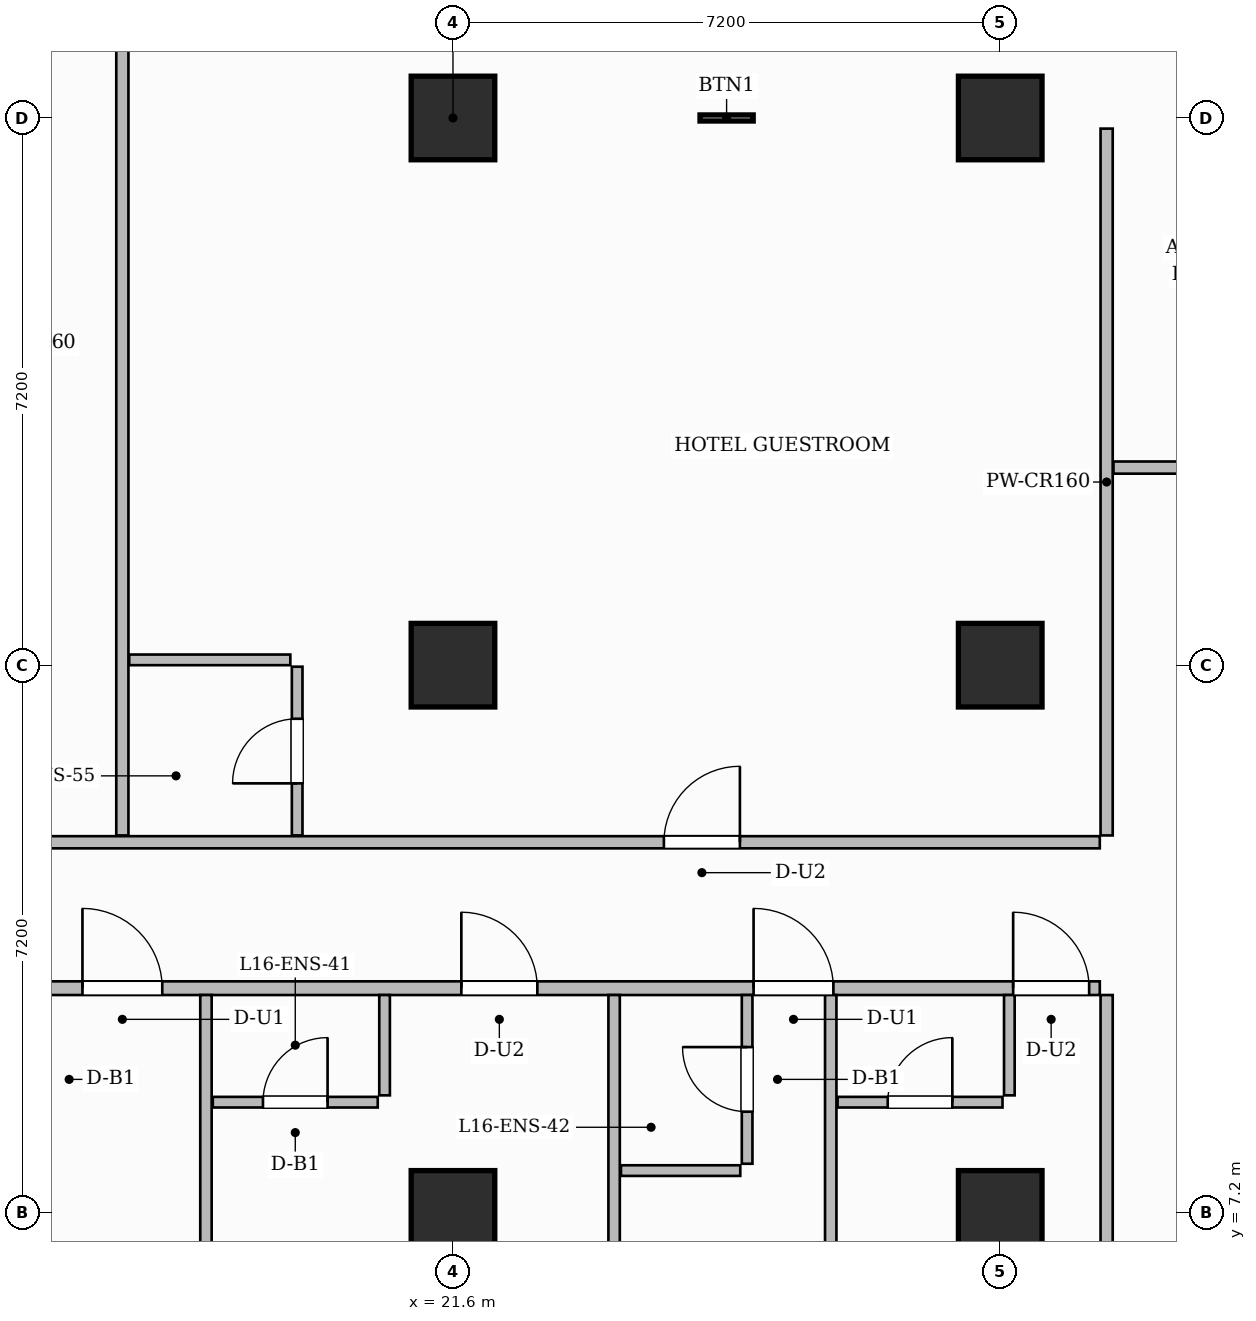
"""IFC4 building model, lengths in metres.
Left out: names, types, materials, properties, quantities, classifications, styles, units other than length and angle.
Written with IfcOpenShell. Run it as: python <this file> out.ifc"""

import sys

from ifc_helpers import new_model, si_unit, direction, frame, frame_2d, origin, origin_2d, place, context, subcontext, project, spatial, rectangle, extrude, source, transform, mapped, element, fill, save


model = new_model("IFC4")
c1 = context("Model", 3, precision=1e-05, world=origin(), true_north=direction((0.0, 1.0)))
c2 = subcontext(c1, "Body", "Model", "MODEL_VIEW")
j1 = project(units=[si_unit("LENGTHUNIT", "METRE"), si_unit("PLANEANGLEUNIT", "RADIAN")], contexts=[c1])
p1 = place(None, origin())
s1 = spatial("IfcSite", under=j1, at=p1, CompositionType="ELEMENT")
p2 = place(p1, origin())
s2 = spatial("IfcBuilding", under=s1, at=p2, CompositionType="ELEMENT")
p3 = place(p2, frame((0.0, 0.0, 69.4)))
s3 = spatial("IfcBuildingStorey", under=s2, at=p3, CompositionType="ELEMENT", Elevation=69.4)
m1 = source(origin(), c2, "Body", "SweptSolid", [
    extrude(rectangle(XDim=1.1, YDim=1.1, at=origin_2d()), origin(), (0.0, 0.0, 1.0), 3.7),
])
for number, where, z_axis, x_axis in (
    (1, (21.6, 7.2, 0.0), (0.0, 0.0, 1.0), (1.0, 0.0, 0.0)),
    (2, (21.6, 14.4, 0.0), (0.0, 0.0, 1.0), (1.0, 0.0, 0.0)),
    (3, (21.6, 21.6, 0.0), (0.0, 0.0, 1.0), (1.0, 0.0, 0.0)),
    (4, (28.8, 7.2, 0.0), (0.0, 0.0, 1.0), (1.0, 0.0, 0.0)),
    (5, (28.8, 14.4, 0.0), (0.0, 0.0, 1.0), (1.0, 0.0, 0.0)),
    (6, (28.8, 21.6, 0.0), (0.0, 0.0, 1.0), (1.0, 0.0, 0.0)),
):
    element("IfcColumn", number, at=place(p3, frame(where, z_axis=z_axis, x_axis=x_axis)), inside=s3, PredefinedType="COLUMN", context=c2, shape_type="MappedRepresentation", body=[
        mapped(m1, transform((0.0, 0.0, 0.0), scale=1.0)),
    ])
p4 = place(p3, frame((14.568, 10.15, 0.0), z_axis=(0.0, 0.0, 1.0), x_axis=(1.0, 0.0, 0.0)))
e7 = element("IfcWall", 7, at=p4, inside=s3, PredefinedType="PARTITIONING", context=c2, shape_type="SweptSolid", body=[
    extrude(rectangle(XDim=15.542, YDim=0.18, at=frame_2d((7.771, 0.0))), origin(), (0.0, 0.0, 1.0), 3.45),
])
p5 = place(p4, frame((2.157, 0.0, 0.0)))
e8 = element("IfcOpeningElement", 8, at=p5, cuts=e7, PredefinedType="OPENING", context=c2, shape_type="SweptSolid", body=[
    extrude(rectangle(XDim=1.05, YDim=2.25, at=frame_2d((0.525, 1.125))), frame((0.0, 0.1, 0.0), z_axis=(0.0, -1.0, 0.0), x_axis=(1.0, 0.0, 0.0)), (0.0, 0.0, 1.0), 0.2),
])
p6 = place(p4, frame((7.142, 0.0, 0.0)))
e9 = element("IfcOpeningElement", 9, at=p6, cuts=e7, PredefinedType="OPENING", context=c2, shape_type="SweptSolid", body=[
    extrude(rectangle(XDim=1.0, YDim=2.2, at=frame_2d((0.5, 1.1))), frame((0.0, 0.1, 0.0), z_axis=(0.0, -1.0, 0.0), x_axis=(1.0, 0.0, 0.0)), (0.0, 0.0, 1.0), 0.2),
])
p7 = place(p4, frame((10.987, 0.0, 0.0)))
e10 = element("IfcOpeningElement", 10, at=p7, cuts=e7, PredefinedType="OPENING", context=c2, shape_type="SweptSolid", body=[
    extrude(rectangle(XDim=1.05, YDim=2.25, at=frame_2d((0.525, 1.125))), frame((0.0, 0.1, 0.0), z_axis=(0.0, -1.0, 0.0), x_axis=(1.0, 0.0, 0.0)), (0.0, 0.0, 1.0), 0.2),
])
p8 = place(p4, frame((14.402, 0.0, 0.0)))
e11 = element("IfcOpeningElement", 11, at=p8, cuts=e7, PredefinedType="OPENING", context=c2, shape_type="SweptSolid", body=[
    extrude(rectangle(XDim=1.0, YDim=2.2, at=frame_2d((0.5, 1.1))), frame((0.0, 0.1, 0.0), z_axis=(0.0, -1.0, 0.0), x_axis=(1.0, 0.0, 0.0)), (0.0, 0.0, 1.0), 0.2),
])
p9 = place(p3, frame((14.568, 12.07, 0.0), z_axis=(0.0, 0.0, 1.0), x_axis=(1.0, 0.0, 0.0)))
e12 = element("IfcWall", 12, at=p9, inside=s3, PredefinedType="PARTITIONING", context=c2, shape_type="SweptSolid", body=[
    extrude(rectangle(XDim=15.542, YDim=0.16, at=frame_2d((7.771, 0.0))), origin(), (0.0, 0.0, 1.0), 3.45),
])
p10 = place(p9, frame((9.807, 0.0, 0.0)))
e13 = element("IfcOpeningElement", 13, at=p10, cuts=e12, PredefinedType="OPENING", context=c2, shape_type="SweptSolid", body=[
    extrude(rectangle(XDim=1.0, YDim=2.2, at=frame_2d((0.5, 1.1))), frame((0.0, 0.09, 0.0), z_axis=(0.0, -1.0, 0.0), x_axis=(1.0, 0.0, 0.0)), (0.0, 0.0, 1.0), 0.18),
])
p11 = place(p3, frame((30.2, 12.16, 0.0), z_axis=(0.0, 0.0, 1.0), x_axis=(0.0, 1.0, 0.0)))
e14 = element("IfcWall", 14, at=p11, inside=s3, PredefinedType="PARTITIONING", context=c2, shape_type="SweptSolid", body=[
    extrude(rectangle(XDim=9.3, YDim=0.16, at=frame_2d((4.65, 0.0))), origin(), (0.0, 0.0, 1.0), 3.45),
])
p12 = place(p3, frame((30.29, 17.0, 0.0), z_axis=(0.0, 0.0, 1.0), x_axis=(1.0, 0.0, 0.0)))
e15 = element("IfcWall", 15, at=p12, inside=s3, PredefinedType="PARTITIONING", context=c2, shape_type="SweptSolid", body=[
    extrude(rectangle(XDim=19.37, YDim=0.16, at=frame_2d((9.685, 0.0))), origin(), (0.0, 0.0, 1.0), 3.45),
])
p13 = place(p12, frame((1.135, 0.0, 0.0)))
e16 = element("IfcOpeningElement", 16, at=p13, cuts=e15, PredefinedType="OPENING", context=c2, shape_type="SweptSolid", body=[
    extrude(rectangle(XDim=0.85, YDim=2.1, at=frame_2d((0.425, 1.05))), frame((0.0, 0.09, 0.0), z_axis=(0.0, -1.0, 0.0), x_axis=(1.0, 0.0, 0.0)), (0.0, 0.0, 1.0), 0.18),
])
p14 = place(p12, frame((5.71, 0.0, 0.0)))
e17 = element("IfcOpeningElement", 17, at=p14, cuts=e15, PredefinedType="OPENING", context=c2, shape_type="SweptSolid", body=[
    extrude(rectangle(XDim=0.9, YDim=2.15, at=frame_2d((0.45, 1.075))), frame((0.0, 0.09, 0.0), z_axis=(0.0, -1.0, 0.0), x_axis=(1.0, 0.0, 0.0)), (0.0, 0.0, 1.0), 0.18),
])
p15 = place(p12, frame((10.635, 0.0, 0.0)))
e18 = element("IfcOpeningElement", 18, at=p15, cuts=e15, PredefinedType="OPENING", context=c2, shape_type="SweptSolid", body=[
    extrude(rectangle(XDim=0.95, YDim=2.15, at=frame_2d((0.475, 1.075))), frame((0.0, 0.09, 0.0), z_axis=(0.0, -1.0, 0.0), x_axis=(1.0, 0.0, 0.0)), (0.0, 0.0, 1.0), 0.18),
])
p16 = place(p12, frame((16.235, 0.0, 0.0)))
e19 = element("IfcOpeningElement", 19, at=p16, cuts=e15, PredefinedType="OPENING", context=c2, shape_type="SweptSolid", body=[
    extrude(rectangle(XDim=0.95, YDim=2.15, at=frame_2d((0.475, 1.075))), frame((0.0, 0.09, 0.0), z_axis=(0.0, -1.0, 0.0), x_axis=(1.0, 0.0, 0.0)), (0.0, 0.0, 1.0), 0.18),
])
p17 = place(p3, frame((30.2, 0.168, 0.0), z_axis=(0.0, 0.0, 1.0), x_axis=(0.0, 1.0, 0.0)))
e20 = element("IfcWall", 20, at=p17, inside=s3, PredefinedType="PARTITIONING", context=c2, shape_type="SweptSolid", body=[
    extrude(rectangle(XDim=9.892, YDim=0.16, at=frame_2d((4.946, 0.0))), origin(), (0.0, 0.0, 1.0), 3.45),
])
p18 = place(p17, frame((1.957, 0.0, 0.0)))
e21 = element("IfcOpeningElement", 21, at=p18, cuts=e20, PredefinedType="OPENING", context=c2, shape_type="SweptSolid", body=[
    extrude(rectangle(XDim=1.05, YDim=2.15, at=frame_2d((0.525, 1.075))), frame((0.0, 0.09, 0.0), z_axis=(0.0, -1.0, 0.0), x_axis=(1.0, 0.0, 0.0)), (0.0, 0.0, 1.0), 0.18),
])
p19 = place(p3, frame((18.35, 0.168, 0.0), z_axis=(0.0, 0.0, 1.0), x_axis=(0.0, 1.0, 0.0)))
e22 = element("IfcWall", 22, at=p19, inside=s3, PredefinedType="PARTITIONING", context=c2, shape_type="SweptSolid", body=[
    extrude(rectangle(XDim=9.892, YDim=0.15, at=frame_2d((4.946, 0.0))), origin(), (0.0, 0.0, 1.0), 3.45),
])
p20 = place(p3, frame((20.7, 8.74, 0.0), z_axis=(0.0, 0.0, 1.0), x_axis=(0.0, 1.0, 0.0)))
e23 = element("IfcWall", 23, at=p20, inside=s3, PredefinedType="PARTITIONING", context=c2, shape_type="SweptSolid", body=[
    extrude(rectangle(XDim=1.32, YDim=0.14, at=frame_2d((0.66, 0.0))), origin(), (0.0, 0.0, 1.0), 3.45),
])
p21 = place(p3, frame((18.44, 8.65, 0.0), z_axis=(0.0, 0.0, 1.0), x_axis=(1.0, 0.0, 0.0)))
e24 = element("IfcWall", 24, at=p21, inside=s3, PredefinedType="PARTITIONING", context=c2, shape_type="SweptSolid", body=[
    extrude(rectangle(XDim=2.17, YDim=0.14, at=frame_2d((1.085, 0.0))), origin(), (0.0, 0.0, 1.0), 3.45),
])
p22 = place(p21, frame((0.66, 0.0, 0.0)))
e25 = element("IfcOpeningElement", 25, at=p22, cuts=e24, PredefinedType="OPENING", context=c2, shape_type="SweptSolid", body=[
    extrude(rectangle(XDim=0.85, YDim=2.1, at=frame_2d((0.425, 1.05))), frame((0.0, 0.08, 0.0), z_axis=(0.0, -1.0, 0.0), x_axis=(1.0, 0.0, 0.0)), (0.0, 0.0, 1.0), 0.16),
])
p23 = place(p3, frame((23.72, 0.168, 0.0), z_axis=(0.0, 0.0, 1.0), x_axis=(0.0, 1.0, 0.0)))
e26 = element("IfcWall", 26, at=p23, inside=s3, PredefinedType="PARTITIONING", context=c2, shape_type="SweptSolid", body=[
    extrude(rectangle(XDim=9.892, YDim=0.15, at=frame_2d((4.946, 0.0))), origin(), (0.0, 0.0, 1.0), 3.45),
])
p24 = place(p3, frame((25.47, 7.84, 0.0), z_axis=(0.0, 0.0, 1.0), x_axis=(0.0, 1.0, 0.0)))
e27 = element("IfcWall", 27, at=p24, inside=s3, PredefinedType="PARTITIONING", context=c2, shape_type="SweptSolid", body=[
    extrude(rectangle(XDim=2.22, YDim=0.14, at=frame_2d((1.11, 0.0))), origin(), (0.0, 0.0, 1.0), 3.45),
])
p25 = place(p24, frame((0.685, 0.0, 0.0)))
e28 = element("IfcOpeningElement", 28, at=p25, cuts=e27, PredefinedType="OPENING", context=c2, shape_type="SweptSolid", body=[
    extrude(rectangle(XDim=0.85, YDim=2.1, at=frame_2d((0.425, 1.05))), frame((0.0, 0.08, 0.0), z_axis=(0.0, -1.0, 0.0), x_axis=(1.0, 0.0, 0.0)), (0.0, 0.0, 1.0), 0.16),
])
p26 = place(p3, frame((23.81, 7.75, 0.0), z_axis=(0.0, 0.0, 1.0), x_axis=(1.0, 0.0, 0.0)))
e29 = element("IfcWall", 29, at=p26, inside=s3, PredefinedType="PARTITIONING", context=c2, shape_type="SweptSolid", body=[
    extrude(rectangle(XDim=1.57, YDim=0.14, at=frame_2d((0.785, 0.0))), origin(), (0.0, 0.0, 1.0), 3.45),
])
p27 = place(p3, frame((26.57, 0.168, 0.0), z_axis=(0.0, 0.0, 1.0), x_axis=(0.0, 1.0, 0.0)))
e30 = element("IfcWall", 30, at=p27, inside=s3, PredefinedType="PARTITIONING", context=c2, shape_type="SweptSolid", body=[
    extrude(rectangle(XDim=9.892, YDim=0.15, at=frame_2d((4.946, 0.0))), origin(), (0.0, 0.0, 1.0), 3.45),
])
p28 = place(p3, frame((28.92, 8.74, 0.0), z_axis=(0.0, 0.0, 1.0), x_axis=(0.0, 1.0, 0.0)))
e31 = element("IfcWall", 31, at=p28, inside=s3, PredefinedType="PARTITIONING", context=c2, shape_type="SweptSolid", body=[
    extrude(rectangle(XDim=1.32, YDim=0.14, at=frame_2d((0.66, 0.0))), origin(), (0.0, 0.0, 1.0), 2.885),
])
p29 = place(p3, frame((26.66, 8.65, 0.0), z_axis=(0.0, 0.0, 1.0), x_axis=(1.0, 0.0, 0.0)))
e32 = element("IfcWall", 32, at=p29, inside=s3, PredefinedType="PARTITIONING", context=c2, shape_type="SweptSolid", body=[
    extrude(rectangle(XDim=2.17, YDim=0.14, at=frame_2d((1.085, 0.0))), origin(), (0.0, 0.0, 1.0), 3.45),
])
p30 = place(p29, frame((0.66, 0.0, 0.0)))
e33 = element("IfcOpeningElement", 33, at=p30, cuts=e32, PredefinedType="OPENING", context=c2, shape_type="SweptSolid", body=[
    extrude(rectangle(XDim=0.85, YDim=2.1, at=frame_2d((0.425, 1.05))), frame((0.0, 0.08, 0.0), z_axis=(0.0, -1.0, 0.0), x_axis=(1.0, 0.0, 0.0)), (0.0, 0.0, 1.0), 0.16),
])
p31 = place(p3, frame((17.25, 12.16, 0.0), z_axis=(0.0, 0.0, 1.0), x_axis=(0.0, 1.0, 0.0)))
e34 = element("IfcWall", 34, at=p31, inside=s3, PredefinedType="PARTITIONING", context=c2, shape_type="SweptSolid", body=[
    extrude(rectangle(XDim=12.95, YDim=0.16, at=frame_2d((6.475, 0.0))), origin(), (0.0, 0.0, 1.0), 3.45),
])
p32 = place(p3, frame((19.55, 12.16, 0.0), z_axis=(0.0, 0.0, 1.0), x_axis=(0.0, 1.0, 0.0)))
e35 = element("IfcWall", 35, at=p32, inside=s3, PredefinedType="PARTITIONING", context=c2, shape_type="SweptSolid", body=[
    extrude(rectangle(XDim=2.22, YDim=0.14, at=frame_2d((1.11, 0.0))), origin(), (0.0, 0.0, 1.0), 3.45),
])
p33 = place(p32, frame((0.685, 0.0, 0.0)))
e36 = element("IfcOpeningElement", 36, at=p33, cuts=e35, PredefinedType="OPENING", context=c2, shape_type="SweptSolid", body=[
    extrude(rectangle(XDim=0.85, YDim=2.1, at=frame_2d((0.425, 1.05))), frame((0.0, 0.08, 0.0), z_axis=(0.0, -1.0, 0.0), x_axis=(1.0, 0.0, 0.0)), (0.0, 0.0, 1.0), 0.16),
])
p34 = place(p3, frame((17.34, 14.47, 0.0), z_axis=(0.0, 0.0, 1.0), x_axis=(1.0, 0.0, 0.0)))
e37 = element("IfcWall", 37, at=p34, inside=s3, PredefinedType="PARTITIONING", context=c2, shape_type="SweptSolid", body=[
    extrude(rectangle(XDim=2.12, YDim=0.14, at=frame_2d((1.06, 0.0))), origin(), (0.0, 0.0, 1.0), 2.885),
])
m2 = source(origin(), c2, "Body", "SweptSolid", [
    extrude(rectangle(XDim=1.05, YDim=2.25, at=frame_2d((0.525, 1.125))), frame((0.0, 0.025, 0.0), z_axis=(0.0, -1.0, 0.0), x_axis=(1.0, 0.0, 0.0)), (0.0, 0.0, 1.0), 0.05),
])
p35 = place(p5, origin())
e38 = element("IfcDoor", 38, at=p35, inside=s3, OperationType="SINGLE_SWING_LEFT", PredefinedType="DOOR", context=c2, shape_type="MappedRepresentation", body=[
    mapped(m2, transform((0.0, 0.0, 0.0), scale=1.0)),
])
fill(e8, e38)
m3 = source(origin(), c2, "Body", "SweptSolid", [
    extrude(rectangle(XDim=0.85, YDim=2.1, at=frame_2d((0.425, 1.05))), frame((0.0, 0.025, 0.0), z_axis=(0.0, -1.0, 0.0), x_axis=(1.0, 0.0, 0.0)), (0.0, 0.0, 1.0), 0.05),
])
p36 = place(p22, origin())
e39 = element("IfcDoor", 39, at=p36, inside=s3, OperationType="SINGLE_SWING_RIGHT", PredefinedType="DOOR", context=c2, shape_type="MappedRepresentation", body=[
    mapped(m3, transform((0.0, 0.0, 0.0), scale=1.0)),
])
fill(e25, e39)
m4 = source(origin(), c2, "Body", "SweptSolid", [
    extrude(rectangle(XDim=1.0, YDim=2.2, at=frame_2d((0.5, 1.1))), frame((0.0, 0.025, 0.0), z_axis=(0.0, -1.0, 0.0), x_axis=(1.0, 0.0, 0.0)), (0.0, 0.0, 1.0), 0.05),
])
p37 = place(p6, origin())
e40 = element("IfcDoor", 40, at=p37, inside=s3, OperationType="SINGLE_SWING_LEFT", PredefinedType="DOOR", context=c2, shape_type="MappedRepresentation", body=[
    mapped(m4, transform((0.0, 0.0, 0.0), scale=1.0)),
])
fill(e9, e40)
p38 = place(p25, origin())
e41 = element("IfcDoor", 41, at=p38, inside=s3, OperationType="SINGLE_SWING_RIGHT", PredefinedType="DOOR", context=c2, shape_type="MappedRepresentation", body=[
    mapped(m3, transform((0.0, 0.0, 0.0), scale=1.0)),
])
fill(e28, e41)
p39 = place(p7, origin())
e42 = element("IfcDoor", 42, at=p39, inside=s3, OperationType="SINGLE_SWING_LEFT", PredefinedType="DOOR", context=c2, shape_type="MappedRepresentation", body=[
    mapped(m2, transform((0.0, 0.0, 0.0), scale=1.0)),
])
fill(e10, e42)
p40 = place(p30, origin())
e43 = element("IfcDoor", 43, at=p40, inside=s3, OperationType="SINGLE_SWING_RIGHT", PredefinedType="DOOR", context=c2, shape_type="MappedRepresentation", body=[
    mapped(m3, transform((0.0, 0.0, 0.0), scale=1.0)),
])
fill(e33, e43)
p41 = place(p8, origin())
e44 = element("IfcDoor", 44, at=p41, inside=s3, OperationType="SINGLE_SWING_LEFT", PredefinedType="DOOR", context=c2, shape_type="MappedRepresentation", body=[
    mapped(m4, transform((0.0, 0.0, 0.0), scale=1.0)),
])
fill(e11, e44)
p42 = place(p33, origin())
e45 = element("IfcDoor", 45, at=p42, inside=s3, OperationType="SINGLE_SWING_LEFT", PredefinedType="DOOR", context=c2, shape_type="MappedRepresentation", body=[
    mapped(m3, transform((0.0, 0.0, 0.0), scale=1.0)),
])
fill(e36, e45)
p43 = place(p10, origin())
e46 = element("IfcDoor", 46, at=p43, inside=s3, OperationType="SINGLE_SWING_RIGHT", PredefinedType="DOOR", context=c2, shape_type="MappedRepresentation", body=[
    mapped(m4, transform((0.0, 0.0, 0.0), scale=1.0)),
])
fill(e13, e46)
save(model, sys.argv[1])
